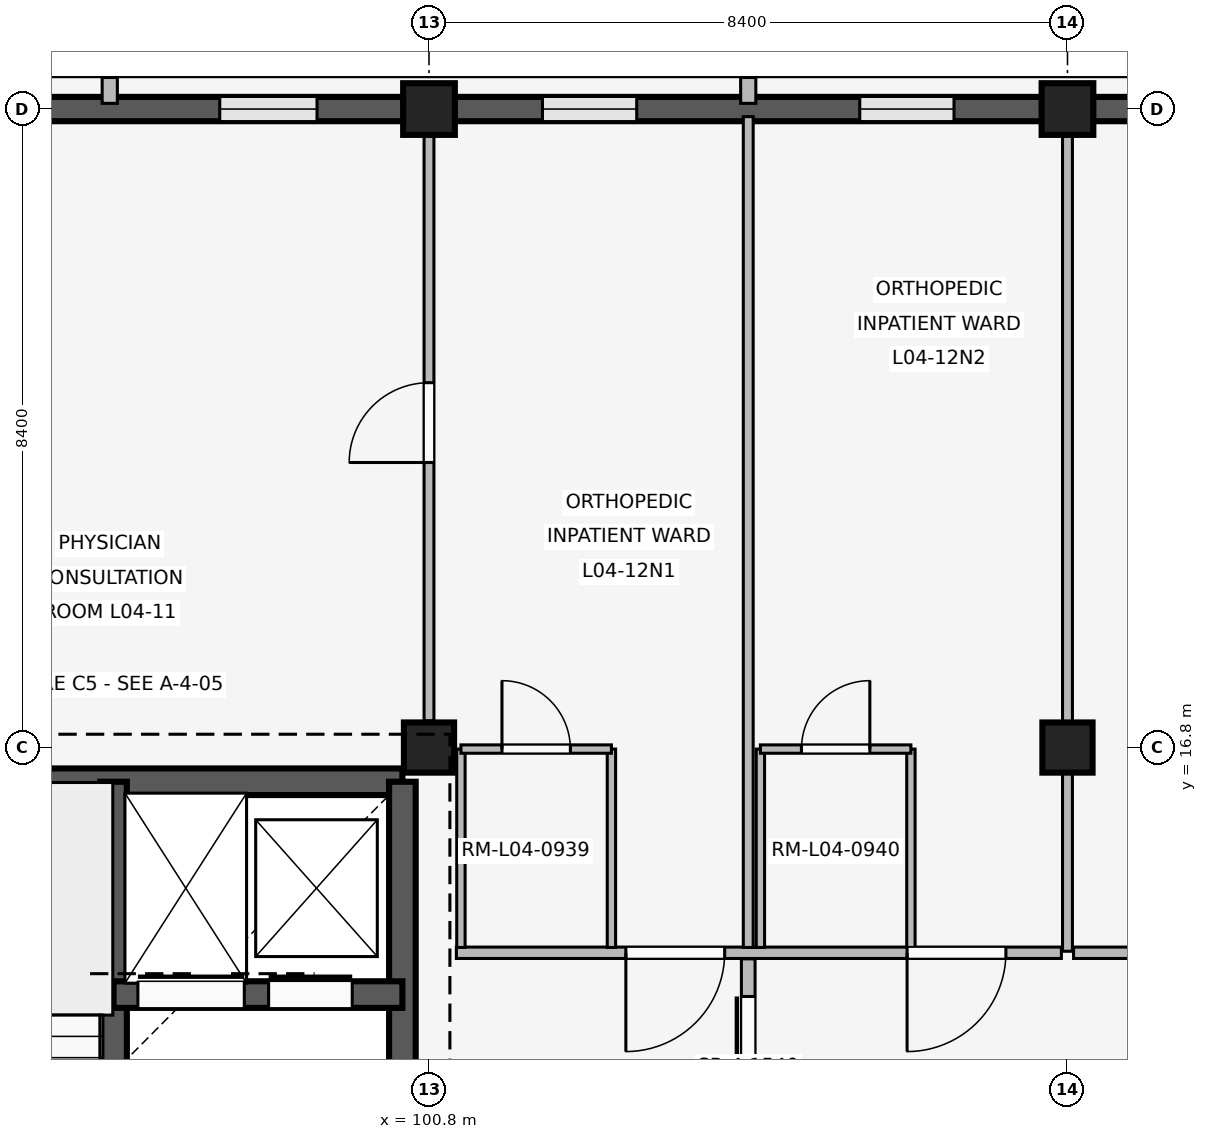
"""IFC4 building model, lengths in metres.
Left out: names, types, materials, properties, quantities, classifications, styles, units other than length and angle.
Written with IfcOpenShell. Run it as: python <this file> out.ifc"""

import sys

from ifc_helpers import new_model, si_unit, direction, frame, frame_2d, origin, origin_2d, place, context, subcontext, project, spatial, rectangle, extrude, element, fill, save


model = new_model("IFC4")
c1 = context("Model", 3, precision=1e-05, world=origin(), true_north=direction((0.0, 1.0)))
c2 = subcontext(c1, "Body", "Model", "MODEL_VIEW")
j1 = project(units=[si_unit("LENGTHUNIT", "METRE"), si_unit("PLANEANGLEUNIT", "RADIAN")], contexts=[c1])
p1 = place(None, origin())
s1 = spatial("IfcSite", under=j1, at=p1, CompositionType="ELEMENT")
p2 = place(p1, origin())
s2 = spatial("IfcBuilding", under=s1, at=p2, CompositionType="ELEMENT")
p3 = place(p2, frame((0.0, 0.0, 16.2)))
s3 = spatial("IfcBuildingStorey", under=s2, at=p3, CompositionType="ELEMENT", Elevation=16.2)
p4 = place(p3, frame((100.8, 16.8, 0.0), z_axis=(0.0, 0.0, 1.0), x_axis=(1.0, 0.0, 0.0)))
e1 = element("IfcColumn", 1, at=p4, inside=s3, PredefinedType="COLUMN", context=c2, shape_type="SweptSolid", body=[
    extrude(rectangle(XDim=0.66, YDim=0.66, at=origin_2d()), origin(), (0.0, 0.0, 1.0), 4.2),
])
p5 = place(p3, frame((100.8, 25.2, 0.0), z_axis=(0.0, 0.0, 1.0), x_axis=(1.0, 0.0, 0.0)))
e2 = element("IfcColumn", 2, at=p5, inside=s3, PredefinedType="COLUMN", context=c2, shape_type="SweptSolid", body=[
    extrude(rectangle(XDim=0.68, YDim=0.68, at=origin_2d()), origin(), (0.0, 0.0, 1.0), 4.2),
])
p6 = place(p3, frame((109.2, 16.8, 0.0), z_axis=(0.0, 0.0, 1.0), x_axis=(1.0, 0.0, 0.0)))
e3 = element("IfcColumn", 3, at=p6, inside=s3, PredefinedType="COLUMN", context=c2, shape_type="SweptSolid", body=[
    extrude(rectangle(XDim=0.66, YDim=0.66, at=origin_2d()), origin(), (0.0, 0.0, 1.0), 4.2),
])
p7 = place(p3, frame((109.2, 25.2, 0.0), z_axis=(0.0, 0.0, 1.0), x_axis=(1.0, 0.0, 0.0)))
e4 = element("IfcColumn", 4, at=p7, inside=s3, PredefinedType="COLUMN", context=c2, shape_type="SweptSolid", body=[
    extrude(rectangle(XDim=0.68, YDim=0.68, at=origin_2d()), origin(), (0.0, 0.0, 1.0), 4.2),
])
p8 = place(p3, frame((92.735, 25.2, 0.0), z_axis=(0.0, 0.0, 1.0), x_axis=(1.0, 0.0, 0.0)))
e5 = element("IfcWall", 5, at=p8, inside=s3, PredefinedType="SOLIDWALL", context=c2, shape_type="SweptSolid", body=[
    extrude(rectangle(XDim=7.73, YDim=0.32, at=frame_2d((3.865, 0.0))), origin(), (0.0, 0.0, 1.0), 3.32),
])
p9 = place(p8, frame((1.138, 0.0, 0.85)))
e6 = element("IfcOpeningElement", 6, at=p9, cuts=e5, PredefinedType="OPENING", context=c2, shape_type="SweptSolid", body=[
    extrude(rectangle(XDim=1.28, YDim=1.38, at=frame_2d((0.64, 0.69))), frame((0.0, 0.17, 0.0), z_axis=(0.0, -1.0, 0.0), x_axis=(1.0, 0.0, 0.0)), (0.0, 0.0, 1.0), 0.34),
])
p10 = place(p8, frame((5.312, 0.0, 0.85)))
e7 = element("IfcOpeningElement", 7, at=p10, cuts=e5, PredefinedType="OPENING", context=c2, shape_type="SweptSolid", body=[
    extrude(rectangle(XDim=1.28, YDim=1.38, at=frame_2d((0.64, 0.69))), frame((0.0, 0.17, 0.0), z_axis=(0.0, -1.0, 0.0), x_axis=(1.0, 0.0, 0.0)), (0.0, 0.0, 1.0), 0.34),
])
p11 = place(p3, frame((96.6, 25.275, 0.0), z_axis=(0.0, 0.0, 1.0), x_axis=(0.0, 1.0, 0.0)))
e8 = element("IfcWall", 8, at=p11, inside=s3, PredefinedType="ELEMENTEDWALL", context=c2, shape_type="SweptSolid", body=[
    extrude(rectangle(XDim=0.34, YDim=0.2, at=frame_2d((0.17, 0.0))), origin(), (0.0, 0.0, 1.0), 3.3),
])
p12 = place(p3, frame((101.135, 25.2, 0.0), z_axis=(0.0, 0.0, 1.0), x_axis=(1.0, 0.0, 0.0)))
e9 = element("IfcWall", 9, at=p12, inside=s3, PredefinedType="SOLIDWALL", context=c2, shape_type="SweptSolid", body=[
    extrude(rectangle(XDim=7.73, YDim=0.32, at=frame_2d((3.865, 0.0))), origin(), (0.0, 0.0, 1.0), 3.32),
])
p13 = place(p12, frame((1.158, 0.0, 0.85)))
e10 = element("IfcOpeningElement", 10, at=p13, cuts=e9, PredefinedType="OPENING", context=c2, shape_type="SweptSolid", body=[
    extrude(rectangle(XDim=1.24, YDim=1.34, at=frame_2d((0.62, 0.67))), frame((0.0, 0.17, 0.0), z_axis=(0.0, -1.0, 0.0), x_axis=(1.0, 0.0, 0.0)), (0.0, 0.0, 1.0), 0.34),
])
p14 = place(p12, frame((5.332, 0.0, 0.85)))
e11 = element("IfcOpeningElement", 11, at=p14, cuts=e9, PredefinedType="OPENING", context=c2, shape_type="SweptSolid", body=[
    extrude(rectangle(XDim=1.24, YDim=1.34, at=frame_2d((0.62, 0.67))), frame((0.0, 0.17, 0.0), z_axis=(0.0, -1.0, 0.0), x_axis=(1.0, 0.0, 0.0)), (0.0, 0.0, 1.0), 0.34),
])
p15 = place(p3, frame((105.0, 25.275, 0.0), z_axis=(0.0, 0.0, 1.0), x_axis=(0.0, 1.0, 0.0)))
e12 = element("IfcWall", 12, at=p15, inside=s3, PredefinedType="ELEMENTEDWALL", context=c2, shape_type="SweptSolid", body=[
    extrude(rectangle(XDim=0.34, YDim=0.2, at=frame_2d((0.17, 0.0))), origin(), (0.0, 0.0, 1.0), 3.3),
])
p16 = place(p3, frame((109.535, 25.2, 0.0), z_axis=(0.0, 0.0, 1.0), x_axis=(1.0, 0.0, 0.0)))
e13 = element("IfcWall", 13, at=p16, inside=s3, PredefinedType="SOLIDWALL", context=c2, shape_type="SweptSolid", body=[
    extrude(rectangle(XDim=7.73, YDim=0.32, at=frame_2d((3.865, 0.0))), origin(), (0.0, 0.0, 1.0), 3.32),
])
p17 = place(p16, frame((0.968, 0.0, 0.85)))
e14 = element("IfcOpeningElement", 14, at=p17, cuts=e13, PredefinedType="OPENING", context=c2, shape_type="SweptSolid", body=[
    extrude(rectangle(XDim=1.62, YDim=1.52, at=frame_2d((0.81, 0.76))), frame((0.0, 0.17, 0.0), z_axis=(0.0, -1.0, 0.0), x_axis=(1.0, 0.0, 0.0)), (0.0, 0.0, 1.0), 0.34),
])
p18 = place(p16, frame((5.142, 0.0, 0.85)))
e15 = element("IfcOpeningElement", 15, at=p18, cuts=e13, PredefinedType="OPENING", context=c2, shape_type="SweptSolid", body=[
    extrude(rectangle(XDim=1.62, YDim=1.52, at=frame_2d((0.81, 0.76))), frame((0.0, 0.17, 0.0), z_axis=(0.0, -1.0, 0.0), x_axis=(1.0, 0.0, 0.0)), (0.0, 0.0, 1.0), 0.34),
])
p19 = place(p3, frame((92.95, 16.35, 0.0), z_axis=(0.0, 0.0, 1.0), x_axis=(1.0, 0.0, 0.0)))
e16 = element("IfcWall", 16, at=p19, inside=s3, PredefinedType="SHEAR", context=c2, shape_type="SweptSolid", body=[
    extrude(rectangle(XDim=7.5, YDim=0.35, at=frame_2d((3.75, 0.0))), origin(), (0.0, 0.0, 1.0), 3.92),
])
p20 = place(p3, frame((100.45, 8.8, 0.0), z_axis=(0.0, 0.0, 1.0), x_axis=(0.0, 1.0, 0.0)))
e17 = element("IfcWall", 17, at=p20, inside=s3, PredefinedType="SHEAR", context=c2, shape_type="SweptSolid", body=[
    extrude(rectangle(XDim=7.55, YDim=0.35, at=frame_2d((3.775, 0.0))), origin(), (0.0, 0.0, 1.0), 3.92),
])
p21 = place(p20, frame((2.4, 0.0, 0.0)))
e18 = element("IfcOpeningElement", 18, at=p21, cuts=e17, PredefinedType="OPENING", context=c2, shape_type="SweptSolid", body=[
    extrude(rectangle(XDim=1.2, YDim=2.2, at=frame_2d((0.6, 1.1))), frame((0.0, 0.185, 0.0), z_axis=(0.0, -1.0, 0.0), x_axis=(1.0, 0.0, 0.0)), (0.0, 0.0, 1.0), 0.37),
])
p22 = place(p3, frame((96.65, 8.8, 0.0), z_axis=(0.0, 0.0, 1.0), x_axis=(0.0, 1.0, 0.0)))
e19 = element("IfcWall", 19, at=p22, inside=s3, PredefinedType="SHEAR", context=c2, shape_type="SweptSolid", body=[
    extrude(rectangle(XDim=7.55, YDim=0.35, at=frame_2d((3.775, 0.0))), origin(), (0.0, 0.0, 1.0), 3.92),
])
p23 = place(p22, frame((0.28, 0.0, 0.0)))
e20 = element("IfcOpeningElement", 20, at=p23, cuts=e19, PredefinedType="OPENING", context=c2, shape_type="SweptSolid", body=[
    extrude(rectangle(XDim=1.0, YDim=2.15, at=frame_2d((0.5, 1.075))), frame((0.0, 0.185, 0.0), z_axis=(0.0, -1.0, 0.0), x_axis=(1.0, 0.0, 0.0)), (0.0, 0.0, 1.0), 0.37),
])
p24 = place(p3, frame((96.65, 13.55, 0.0), z_axis=(0.0, 0.0, 1.0), x_axis=(1.0, 0.0, 0.0)))
e21 = element("IfcWall", 21, at=p24, inside=s3, PredefinedType="SHEAR", context=c2, shape_type="SweptSolid", body=[
    extrude(rectangle(XDim=3.8, YDim=0.35, at=frame_2d((1.9, 0.0))), origin(), (0.0, 0.0, 1.0), 3.92),
])
p25 = place(p24, frame((0.32, 0.0, 0.0)))
e22 = element("IfcOpeningElement", 22, at=p25, cuts=e21, PredefinedType="OPENING", context=c2, shape_type="SweptSolid", body=[
    extrude(rectangle(XDim=1.4, YDim=2.25, at=frame_2d((0.7, 1.125))), frame((0.0, 0.185, 0.0), z_axis=(0.0, -1.0, 0.0), x_axis=(1.0, 0.0, 0.0)), (0.0, 0.0, 1.0), 0.37),
])
p26 = place(p24, frame((2.04, 0.0, 0.0)))
e23 = element("IfcOpeningElement", 23, at=p26, cuts=e21, PredefinedType="OPENING", context=c2, shape_type="SweptSolid", body=[
    extrude(rectangle(XDim=1.1, YDim=2.15, at=frame_2d((0.55, 1.075))), frame((0.0, 0.185, 0.0), z_axis=(0.0, -1.0, 0.0), x_axis=(1.0, 0.0, 0.0)), (0.0, 0.0, 1.0), 0.37),
])
p27 = place(p3, frame((100.8, 17.15, 0.0), z_axis=(0.0, 0.0, 1.0), x_axis=(0.0, 1.0, 0.0)))
e24 = element("IfcWall", 24, at=p27, inside=s3, PredefinedType="PARTITIONING", context=c2, shape_type="SweptSolid", body=[
    extrude(rectangle(XDim=7.91, YDim=0.13, at=frame_2d((3.955, 0.0))), origin(), (0.0, 0.0, 1.0), 3.3),
])
p28 = place(p27, frame((3.4, 0.0, 0.0)))
e25 = element("IfcOpeningElement", 25, at=p28, cuts=e24, PredefinedType="OPENING", context=c2, shape_type="SweptSolid", body=[
    extrude(rectangle(XDim=1.05, YDim=2.2, at=frame_2d((0.525, 1.1))), frame((0.0, 0.075, 0.0), z_axis=(0.0, -1.0, 0.0), x_axis=(1.0, 0.0, 0.0)), (0.0, 0.0, 1.0), 0.15),
])
p29 = place(p3, frame((109.12, 14.1, 0.0), z_axis=(0.0, 0.0, 1.0), x_axis=(-1.0, 0.0, 0.0)))
e26 = element("IfcWall", 26, at=p29, inside=s3, PredefinedType="PARTITIONING", context=c2, shape_type="SweptSolid", body=[
    extrude(rectangle(XDim=7.96, YDim=0.15, at=frame_2d((3.98, 0.0))), origin(), (0.0, 0.0, 1.0), 3.3),
])
p30 = place(p29, frame((0.73, 0.0, 0.0)))
e27 = element("IfcOpeningElement", 27, at=p30, cuts=e26, PredefinedType="OPENING", context=c2, shape_type="SweptSolid", body=[
    extrude(rectangle(XDim=1.3, YDim=2.25, at=frame_2d((0.65, 1.125))), frame((0.0, 0.085, 0.0), z_axis=(0.0, -1.0, 0.0), x_axis=(1.0, 0.0, 0.0)), (0.0, 0.0, 1.0), 0.17),
])
p31 = place(p29, frame((4.43, 0.0, 0.0)))
e28 = element("IfcOpeningElement", 28, at=p31, cuts=e26, PredefinedType="OPENING", context=c2, shape_type="SweptSolid", body=[
    extrude(rectangle(XDim=1.3, YDim=2.25, at=frame_2d((0.65, 1.125))), frame((0.0, 0.085, 0.0), z_axis=(0.0, -1.0, 0.0), x_axis=(1.0, 0.0, 0.0)), (0.0, 0.0, 1.0), 0.17),
])
p32 = place(p3, frame((105.0, 14.17, 0.0), z_axis=(0.0, 0.0, 1.0), x_axis=(0.0, 1.0, 0.0)))
e29 = element("IfcWall", 29, at=p32, inside=s3, PredefinedType="PARTITIONING", context=c2, shape_type="SweptSolid", body=[
    extrude(rectangle(XDim=10.93, YDim=0.13, at=frame_2d((5.465, 0.0))), origin(), (0.0, 0.0, 1.0), 3.3),
])
for number, where, z_axis, x_axis in (
    (30, (101.22, 14.17, 0.0), (0.0, 0.0, 1.0), (0.0, 1.0, 0.0)),
    (31, (103.2, 14.17, 0.0), (0.0, 0.0, 1.0), (0.0, 1.0, 0.0)),
):
    element("IfcWall", number, at=place(p3, frame(where, z_axis=z_axis, x_axis=x_axis)), inside=s3, PredefinedType="PARTITIONING", context=c2, shape_type="SweptSolid", body=[
        extrude(rectangle(XDim=2.61, YDim=0.11, at=frame_2d((1.305, 0.0))), origin(), (0.0, 0.0, 1.0), 3.3),
    ])
p33 = place(p3, frame((101.22, 16.78, 0.0), z_axis=(0.0, 0.0, 1.0), x_axis=(1.0, 0.0, 0.0)))
e32 = element("IfcWall", 32, at=p33, inside=s3, PredefinedType="PARTITIONING", context=c2, shape_type="SweptSolid", body=[
    extrude(rectangle(XDim=1.98, YDim=0.11, at=frame_2d((0.99, 0.0))), origin(), (0.0, 0.0, 1.0), 3.3),
])
p34 = place(p33, frame((0.54, 0.0, 0.0)))
e33 = element("IfcOpeningElement", 33, at=p34, cuts=e32, PredefinedType="OPENING", context=c2, shape_type="SweptSolid", body=[
    extrude(rectangle(XDim=0.9, YDim=2.1, at=frame_2d((0.45, 1.05))), frame((0.0, 0.065, 0.0), z_axis=(0.0, -1.0, 0.0), x_axis=(1.0, 0.0, 0.0)), (0.0, 0.0, 1.0), 0.13),
])
for number, where, z_axis, x_axis in (
    (34, (105.16, 14.17, 0.0), (0.0, 0.0, 1.0), (0.0, 1.0, 0.0)),
    (35, (107.14, 14.17, 0.0), (0.0, 0.0, 1.0), (0.0, 1.0, 0.0)),
):
    element("IfcWall", number, at=place(p3, frame(where, z_axis=z_axis, x_axis=x_axis)), inside=s3, PredefinedType="PARTITIONING", context=c2, shape_type="SweptSolid", body=[
        extrude(rectangle(XDim=2.61, YDim=0.11, at=frame_2d((1.305, 0.0))), origin(), (0.0, 0.0, 1.0), 3.3),
    ])
p35 = place(p3, frame((105.16, 16.78, 0.0), z_axis=(0.0, 0.0, 1.0), x_axis=(1.0, 0.0, 0.0)))
e36 = element("IfcWall", 36, at=p35, inside=s3, PredefinedType="PARTITIONING", context=c2, shape_type="SweptSolid", body=[
    extrude(rectangle(XDim=1.98, YDim=0.11, at=frame_2d((0.99, 0.0))), origin(), (0.0, 0.0, 1.0), 3.3),
])
p36 = place(p35, frame((0.54, 0.0, 0.0)))
e37 = element("IfcOpeningElement", 37, at=p36, cuts=e36, PredefinedType="OPENING", context=c2, shape_type="SweptSolid", body=[
    extrude(rectangle(XDim=0.9, YDim=2.1, at=frame_2d((0.45, 1.05))), frame((0.0, 0.065, 0.0), z_axis=(0.0, -1.0, 0.0), x_axis=(1.0, 0.0, 0.0)), (0.0, 0.0, 1.0), 0.13),
])
p37 = place(p3, frame((105.0, 11.18, 0.0), z_axis=(0.0, 0.0, 1.0), x_axis=(0.0, 1.0, 0.0)))
e38 = element("IfcWall", 38, at=p37, inside=s3, PredefinedType="PARTITIONING", context=c2, shape_type="SweptSolid", body=[
    extrude(rectangle(XDim=2.84, YDim=0.18, at=frame_2d((1.42, 0.0))), origin(), (0.0, 0.0, 1.0), 3.3),
])
p38 = place(p37, frame((0.495, 0.0, 0.0)))
e39 = element("IfcOpeningElement", 39, at=p38, cuts=e38, PredefinedType="OPENING", context=c2, shape_type="SweptSolid", body=[
    extrude(rectangle(XDim=1.85, YDim=2.3, at=frame_2d((0.925, 1.15))), frame((0.0, 0.1, 0.0), z_axis=(0.0, -1.0, 0.0), x_axis=(1.0, 0.0, 0.0)), (0.0, 0.0, 1.0), 0.2),
])
p39 = place(p3, frame((109.2, 14.12, 0.0), z_axis=(0.0, 0.0, 1.0), x_axis=(0.0, 1.0, 0.0)))
e40 = element("IfcWall", 40, at=p39, inside=s3, PredefinedType="PARTITIONING", context=c2, shape_type="SweptSolid", body=[
    extrude(rectangle(XDim=10.94, YDim=0.13, at=frame_2d((5.47, 0.0))), origin(), (0.0, 0.0, 1.0), 3.3),
])
p40 = place(p3, frame((117.46, 14.1, 0.0), z_axis=(0.0, 0.0, 1.0), x_axis=(-1.0, 0.0, 0.0)))
e41 = element("IfcWall", 41, at=p40, inside=s3, PredefinedType="PARTITIONING", context=c2, shape_type="SweptSolid", body=[
    extrude(rectangle(XDim=8.18, YDim=0.15, at=frame_2d((4.09, 0.0))), origin(), (0.0, 0.0, 1.0), 3.3),
])
p41 = place(p40, frame((3.465, 0.0, 0.0)))
e42 = element("IfcOpeningElement", 42, at=p41, cuts=e41, PredefinedType="OPENING", context=c2, shape_type="SweptSolid", body=[
    extrude(rectangle(XDim=1.25, YDim=2.2, at=frame_2d((0.625, 1.1))), frame((0.0, 0.085, 0.0), z_axis=(0.0, -1.0, 0.0), x_axis=(1.0, 0.0, 0.0)), (0.0, 0.0, 1.0), 0.17),
])
p42 = place(p10, origin())
e43 = element("IfcWindow", 43, at=p42, inside=s3, PartitioningType="SINGLE_PANEL", PredefinedType="WINDOW", context=c2, shape_type="SweptSolid", body=[
    extrude(rectangle(XDim=1.28, YDim=1.38, at=frame_2d((0.64, 0.69))), frame((0.0, 0.03, 0.0), z_axis=(0.0, -1.0, 0.0), x_axis=(1.0, 0.0, 0.0)), (0.0, 0.0, 1.0), 0.06),
])
fill(e7, e43)
p43 = place(p13, origin())
e44 = element("IfcWindow", 44, at=p43, inside=s3, PartitioningType="SINGLE_PANEL", PredefinedType="WINDOW", context=c2, shape_type="SweptSolid", body=[
    extrude(rectangle(XDim=1.24, YDim=1.34, at=frame_2d((0.62, 0.67))), frame((0.0, 0.03, 0.0), z_axis=(0.0, -1.0, 0.0), x_axis=(1.0, 0.0, 0.0)), (0.0, 0.0, 1.0), 0.06),
])
fill(e10, e44)
p44 = place(p14, origin())
e45 = element("IfcWindow", 45, at=p44, inside=s3, PartitioningType="SINGLE_PANEL", PredefinedType="WINDOW", context=c2, shape_type="SweptSolid", body=[
    extrude(rectangle(XDim=1.24, YDim=1.34, at=frame_2d((0.62, 0.67))), frame((0.0, 0.03, 0.0), z_axis=(0.0, -1.0, 0.0), x_axis=(1.0, 0.0, 0.0)), (0.0, 0.0, 1.0), 0.06),
])
fill(e11, e45)
p45 = place(p25, origin())
e46 = element("IfcDoor", 46, at=p45, inside=s3, OperationType="SLIDING_TO_LEFT", PredefinedType="DOOR", context=c2, shape_type="SweptSolid", body=[
    extrude(rectangle(XDim=1.4, YDim=2.25, at=frame_2d((0.7, 1.125))), frame((0.0, 0.025, 0.0), z_axis=(0.0, -1.0, 0.0), x_axis=(1.0, 0.0, 0.0)), (0.0, 0.0, 1.0), 0.05),
])
fill(e22, e46)
p46 = place(p26, origin())
e47 = element("IfcDoor", 47, at=p46, inside=s3, OperationType="SLIDING_TO_LEFT", PredefinedType="DOOR", context=c2, shape_type="SweptSolid", body=[
    extrude(rectangle(XDim=1.1, YDim=2.15, at=frame_2d((0.55, 1.075))), frame((0.0, 0.025, 0.0), z_axis=(0.0, -1.0, 0.0), x_axis=(1.0, 0.0, 0.0)), (0.0, 0.0, 1.0), 0.05),
])
fill(e23, e47)
p47 = place(p28, origin())
e48 = element("IfcDoor", 48, at=p47, inside=s3, OperationType="SINGLE_SWING_LEFT", PredefinedType="DOOR", context=c2, shape_type="SweptSolid", body=[
    extrude(rectangle(XDim=1.05, YDim=2.2, at=frame_2d((0.525, 1.1))), frame((0.0, 0.025, 0.0), z_axis=(0.0, -1.0, 0.0), x_axis=(1.0, 0.0, 0.0)), (0.0, 0.0, 1.0), 0.05),
])
fill(e25, e48)
p48 = place(p30, origin())
e49 = element("IfcDoor", 49, at=p48, inside=s3, OperationType="SINGLE_SWING_RIGHT", PredefinedType="DOOR", context=c2, shape_type="SweptSolid", body=[
    extrude(rectangle(XDim=1.3, YDim=2.25, at=frame_2d((0.65, 1.125))), frame((0.0, 0.025, 0.0), z_axis=(0.0, -1.0, 0.0), x_axis=(1.0, 0.0, 0.0)), (0.0, 0.0, 1.0), 0.05),
])
fill(e27, e49)
p49 = place(p31, origin())
e50 = element("IfcDoor", 50, at=p49, inside=s3, OperationType="SINGLE_SWING_RIGHT", PredefinedType="DOOR", context=c2, shape_type="SweptSolid", body=[
    extrude(rectangle(XDim=1.3, YDim=2.25, at=frame_2d((0.65, 1.125))), frame((0.0, 0.025, 0.0), z_axis=(0.0, -1.0, 0.0), x_axis=(1.0, 0.0, 0.0)), (0.0, 0.0, 1.0), 0.05),
])
fill(e28, e50)
p50 = place(p34, origin())
e51 = element("IfcDoor", 51, at=p50, inside=s3, OperationType="SINGLE_SWING_LEFT", PredefinedType="DOOR", context=c2, shape_type="SweptSolid", body=[
    extrude(rectangle(XDim=0.9, YDim=2.1, at=frame_2d((0.45, 1.05))), frame((0.0, 0.025, 0.0), z_axis=(0.0, -1.0, 0.0), x_axis=(1.0, 0.0, 0.0)), (0.0, 0.0, 1.0), 0.05),
])
fill(e33, e51)
p51 = place(p36, origin())
e52 = element("IfcDoor", 52, at=p51, inside=s3, OperationType="SINGLE_SWING_RIGHT", PredefinedType="DOOR", context=c2, shape_type="SweptSolid", body=[
    extrude(rectangle(XDim=0.9, YDim=2.1, at=frame_2d((0.45, 1.05))), frame((0.0, 0.025, 0.0), z_axis=(0.0, -1.0, 0.0), x_axis=(1.0, 0.0, 0.0)), (0.0, 0.0, 1.0), 0.05),
])
fill(e37, e52)
p52 = place(p38, origin())
e53 = element("IfcDoor", 53, at=p52, inside=s3, OperationType="SLIDING_TO_LEFT", PredefinedType="DOOR", context=c2, shape_type="SweptSolid", body=[
    extrude(rectangle(XDim=1.85, YDim=2.3, at=frame_2d((0.925, 1.15))), frame((0.0, 0.025, 0.0), z_axis=(0.0, -1.0, 0.0), x_axis=(1.0, 0.0, 0.0)), (0.0, 0.0, 1.0), 0.05),
])
fill(e39, e53)
save(model, sys.argv[1])
